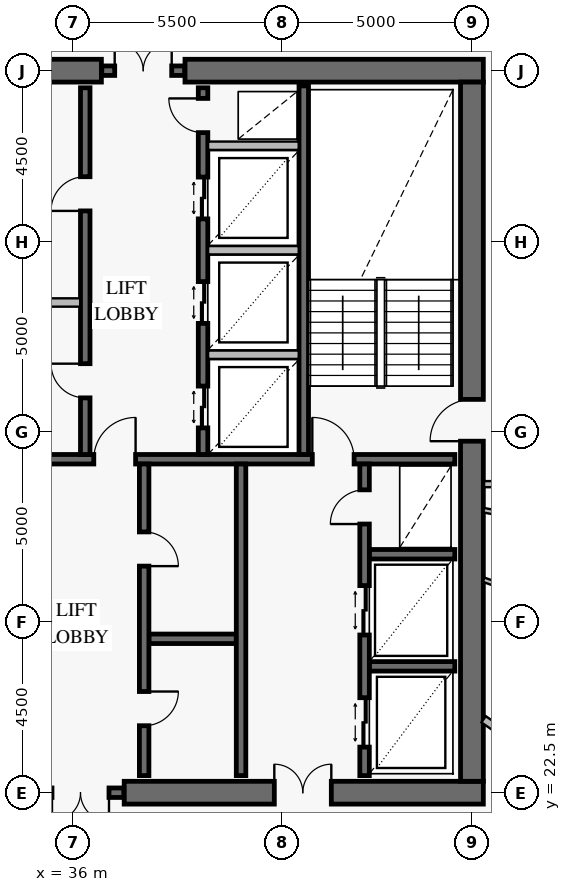
"""IFC4 building model, lengths in metres.
Left out: names, types, materials, properties, quantities, classifications, styles, units other than length and angle.
Written with IfcOpenShell. Run it as: python <this file> out.ifc"""

import sys

from ifc_helpers import new_model, si_unit, direction, frame, frame_2d, origin, place, context, subcontext, project, spatial, rectangle, extrude, element, fill, save


model = new_model("IFC4")
c1 = context("Model", 3, precision=1e-05, world=origin(), true_north=direction((0.0, 1.0)))
c2 = subcontext(c1, "Body", "Model", "MODEL_VIEW")
j1 = project(units=[si_unit("LENGTHUNIT", "METRE"), si_unit("PLANEANGLEUNIT", "RADIAN")], contexts=[c1])
p1 = place(None, origin())
s1 = spatial("IfcSite", under=j1, at=p1, CompositionType="ELEMENT")
p2 = place(p1, origin())
s2 = spatial("IfcBuilding", under=s1, at=p2, CompositionType="ELEMENT")
p3 = place(p2, frame((0.0, 0.0, 276.8)))
s3 = spatial("IfcBuildingStorey", under=s2, at=p3, CompositionType="ELEMENT", Elevation=276.8)
p4 = place(p3, frame((37.35, 22.5, 0.0), z_axis=(0.0, 0.0, 1.0), x_axis=(1.0, 0.0, 0.0)))
e1 = element("IfcWall", 1, at=p4, inside=s3, PredefinedType="SHEAR", context=c2, shape_type="SweptSolid", body=[
    extrude(rectangle(XDim=9.45, YDim=0.6, at=frame_2d((4.725, 0.0))), origin(), (0.0, 0.0, 1.0), 3.8),
])
p5 = place(p4, frame((3.95, 0.0, 0.0)))
e2 = element("IfcOpeningElement", 2, at=p5, cuts=e1, PredefinedType="OPENING", context=c2, shape_type="SweptSolid", body=[
    extrude(rectangle(XDim=1.5, YDim=2.15, at=frame_2d((0.75, 1.075))), frame((0.0, 0.312, 0.0), z_axis=(0.0, -1.0, 0.0), x_axis=(1.0, 0.0, 0.0)), (0.0, 0.0, 1.0), 0.624),
])
p6 = place(p3, frame((46.8, 41.5, 0.0), z_axis=(0.0, 0.0, 1.0), x_axis=(-1.0, 0.0, 0.0)))
e3 = element("IfcWall", 3, at=p6, inside=s3, PredefinedType="SHEAR", context=c2, shape_type="SweptSolid", body=[
    extrude(rectangle(XDim=7.85, YDim=0.6, at=frame_2d((3.925, 0.0))), origin(), (0.0, 0.0, 1.0), 3.8),
])
p7 = place(p3, frame((36.75, 41.5, 0.0), z_axis=(0.0, 0.0, 1.0), x_axis=(-1.0, 0.0, 0.0)))
e4 = element("IfcWall", 4, at=p7, inside=s3, PredefinedType="SHEAR", context=c2, shape_type="SweptSolid", body=[
    extrude(rectangle(XDim=11.55, YDim=0.6, at=frame_2d((5.775, 0.0))), origin(), (0.0, 0.0, 1.0), 3.8),
])
p8 = place(p7, frame((4.25, 0.0, 0.0)))
e5 = element("IfcOpeningElement", 5, at=p8, cuts=e4, PredefinedType="OPENING", context=c2, shape_type="SweptSolid", body=[
    extrude(rectangle(XDim=1.1, YDim=2.15, at=frame_2d((0.55, 1.075))), frame((0.0, 0.312, 0.0), z_axis=(0.0, -1.0, 0.0), x_axis=(1.0, 0.0, 0.0)), (0.0, 0.0, 1.0), 0.624),
])
p9 = place(p3, frame((46.5, 22.8, 0.0), z_axis=(0.0, 0.0, 1.0), x_axis=(0.0, 1.0, 0.0)))
e6 = element("IfcWall", 6, at=p9, inside=s3, PredefinedType="SHEAR", context=c2, shape_type="SweptSolid", body=[
    extrude(rectangle(XDim=18.4, YDim=0.6, at=frame_2d((9.2, 0.0))), origin(), (0.0, 0.0, 1.0), 3.8),
])
p10 = place(p9, frame((8.95, 0.0, 0.0)))
e7 = element("IfcOpeningElement", 7, at=p10, cuts=e6, PredefinedType="OPENING", context=c2, shape_type="SweptSolid", body=[
    extrude(rectangle(XDim=1.1, YDim=2.15, at=frame_2d((0.55, 1.075))), frame((0.0, 0.312, 0.0), z_axis=(0.0, -1.0, 0.0), x_axis=(1.0, 0.0, 0.0)), (0.0, 0.0, 1.0), 0.624),
])
p11 = place(p3, frame((35.06, 22.5, 0.0), z_axis=(0.0, 0.0, 1.0), x_axis=(1.0, 0.0, 0.0)))
e8 = element("IfcWall", 8, at=p11, inside=s3, PredefinedType="SOLIDWALL", context=c2, shape_type="SweptSolid", body=[
    extrude(rectangle(XDim=2.28, YDim=0.25, at=frame_2d((1.14, 0.0))), origin(), (0.0, 0.0, 1.0), 3.8),
])
p12 = place(p11, frame((0.39, 0.0, 0.0)))
e9 = element("IfcOpeningElement", 9, at=p12, cuts=e8, PredefinedType="OPENING", context=c2, shape_type="SweptSolid", body=[
    extrude(rectangle(XDim=1.5, YDim=2.15, at=frame_2d((0.75, 1.075))), frame((0.0, 0.137, 0.0), z_axis=(0.0, -1.0, 0.0), x_axis=(1.0, 0.0, 0.0)), (0.0, 0.0, 1.0), 0.274),
])
p13 = place(p3, frame((36.76, 41.5, 0.0), z_axis=(0.0, 0.0, 1.0), x_axis=(1.0, 0.0, 0.0)))
e10 = element("IfcWall", 10, at=p13, inside=s3, PredefinedType="SOLIDWALL", context=c2, shape_type="SweptSolid", body=[
    extrude(rectangle(XDim=2.18, YDim=0.25, at=frame_2d((1.09, 0.0))), origin(), (0.0, 0.0, 1.0), 3.8),
])
p14 = place(p13, frame((0.34, 0.0, 0.0)))
e11 = element("IfcOpeningElement", 11, at=p14, cuts=e10, PredefinedType="OPENING", context=c2, shape_type="SweptSolid", body=[
    extrude(rectangle(XDim=1.5, YDim=2.15, at=frame_2d((0.75, 1.075))), frame((0.0, 0.137, 0.0), z_axis=(0.0, -1.0, 0.0), x_axis=(1.0, 0.0, 0.0)), (0.0, 0.0, 1.0), 0.274),
])
p15 = place(p3, frame((25.95, 31.275, 0.0), z_axis=(0.0, 0.0, 1.0), x_axis=(1.0, 0.0, 0.0)))
e12 = element("IfcWall", 12, at=p15, inside=s3, PredefinedType="SOLIDWALL", context=c2, shape_type="SweptSolid", body=[
    extrude(rectangle(XDim=20.1, YDim=0.25, at=frame_2d((10.05, 0.0))), origin(), (0.0, 0.0, 1.0), 3.8),
])
p16 = place(p15, frame((2.6, 0.0, 0.0)))
e13 = element("IfcOpeningElement", 13, at=p16, cuts=e12, PredefinedType="OPENING", context=c2, shape_type="SweptSolid", body=[
    extrude(rectangle(XDim=1.1, YDim=2.15, at=frame_2d((0.55, 1.075))), frame((0.0, 0.137, 0.0), z_axis=(0.0, -1.0, 0.0), x_axis=(1.0, 0.0, 0.0)), (0.0, 0.0, 1.0), 0.274),
])
p17 = place(p15, frame((10.6, 0.0, 0.0)))
e14 = element("IfcOpeningElement", 14, at=p17, cuts=e12, PredefinedType="OPENING", context=c2, shape_type="SweptSolid", body=[
    extrude(rectangle(XDim=1.1, YDim=2.15, at=frame_2d((0.55, 1.075))), frame((0.0, 0.137, 0.0), z_axis=(0.0, -1.0, 0.0), x_axis=(1.0, 0.0, 0.0)), (0.0, 0.0, 1.0), 0.274),
])
p18 = place(p15, frame((16.35, 0.0, 0.0)))
e15 = element("IfcOpeningElement", 15, at=p18, cuts=e12, PredefinedType="OPENING", context=c2, shape_type="SweptSolid", body=[
    extrude(rectangle(XDim=1.1, YDim=2.15, at=frame_2d((0.55, 1.075))), frame((0.0, 0.137, 0.0), z_axis=(0.0, -1.0, 0.0), x_axis=(1.0, 0.0, 0.0)), (0.0, 0.0, 1.0), 0.274),
])
p19 = place(p3, frame((42.075, 31.4, 0.0), z_axis=(0.0, 0.0, 1.0), x_axis=(0.0, 1.0, 0.0)))
e16 = element("IfcWall", 16, at=p19, inside=s3, PredefinedType="SOLIDWALL", context=c2, shape_type="SweptSolid", body=[
    extrude(rectangle(XDim=9.7, YDim=0.25, at=frame_2d((4.85, 0.0))), origin(), (0.0, 0.0, 1.0), 3.8),
])
p20 = place(p3, frame((36.325, 31.4, 0.0), z_axis=(0.0, 0.0, 1.0), x_axis=(0.0, 1.0, 0.0)))
e17 = element("IfcWall", 17, at=p20, inside=s3, PredefinedType="SOLIDWALL", context=c2, shape_type="SweptSolid", body=[
    extrude(rectangle(XDim=9.65, YDim=0.25, at=frame_2d((4.825, 0.0))), origin(), (0.0, 0.0, 1.0), 3.8),
])
p21 = place(p20, frame((1.49, 0.0, 0.0)))
e18 = element("IfcOpeningElement", 18, at=p21, cuts=e17, PredefinedType="OPENING", context=c2, shape_type="SweptSolid", body=[
    extrude(rectangle(XDim=0.9, YDim=2.1, at=frame_2d((0.45, 1.05))), frame((0.0, 0.137, 0.0), z_axis=(0.0, -1.0, 0.0), x_axis=(1.0, 0.0, 0.0)), (0.0, 0.0, 1.0), 0.274),
])
p22 = place(p20, frame((6.41, 0.0, 0.0)))
e19 = element("IfcOpeningElement", 19, at=p22, cuts=e17, PredefinedType="OPENING", context=c2, shape_type="SweptSolid", body=[
    extrude(rectangle(XDim=0.9, YDim=2.1, at=frame_2d((0.45, 1.05))), frame((0.0, 0.137, 0.0), z_axis=(0.0, -1.0, 0.0), x_axis=(1.0, 0.0, 0.0)), (0.0, 0.0, 1.0), 0.274),
])
p23 = place(p3, frame((39.425, 31.4, 0.0), z_axis=(0.0, 0.0, 1.0), x_axis=(0.0, 1.0, 0.0)))
e20 = element("IfcWall", 20, at=p23, inside=s3, PredefinedType="SOLIDWALL", context=c2, shape_type="SweptSolid", body=[
    extrude(rectangle(XDim=9.65, YDim=0.25, at=frame_2d((4.825, 0.0))), origin(), (0.0, 0.0, 1.0), 3.8),
])
p24 = place(p23, frame((0.7, 0.0, 0.0)))
e21 = element("IfcOpeningElement", 21, at=p24, cuts=e20, PredefinedType="OPENING", context=c2, shape_type="SweptSolid", body=[
    extrude(rectangle(XDim=1.1, YDim=2.2, at=frame_2d((0.55, 1.1))), frame((0.0, 0.137, 0.0), z_axis=(0.0, -1.0, 0.0), x_axis=(1.0, 0.0, 0.0)), (0.0, 0.0, 1.0), 0.274),
])
p25 = place(p23, frame((3.45, 0.0, 0.0)))
e22 = element("IfcOpeningElement", 22, at=p25, cuts=e20, PredefinedType="OPENING", context=c2, shape_type="SweptSolid", body=[
    extrude(rectangle(XDim=1.1, YDim=2.2, at=frame_2d((0.55, 1.1))), frame((0.0, 0.137, 0.0), z_axis=(0.0, -1.0, 0.0), x_axis=(1.0, 0.0, 0.0)), (0.0, 0.0, 1.0), 0.274),
])
p26 = place(p23, frame((6.2, 0.0, 0.0)))
e23 = element("IfcOpeningElement", 23, at=p26, cuts=e20, PredefinedType="OPENING", context=c2, shape_type="SweptSolid", body=[
    extrude(rectangle(XDim=1.1, YDim=2.2, at=frame_2d((0.55, 1.1))), frame((0.0, 0.137, 0.0), z_axis=(0.0, -1.0, 0.0), x_axis=(1.0, 0.0, 0.0)), (0.0, 0.0, 1.0), 0.274),
])
p27 = place(p23, frame((8.47, 0.0, 0.0)))
e24 = element("IfcOpeningElement", 24, at=p27, cuts=e20, PredefinedType="OPENING", context=c2, shape_type="SweptSolid", body=[
    extrude(rectangle(XDim=0.9, YDim=2.1, at=frame_2d((0.45, 1.05))), frame((0.0, 0.137, 0.0), z_axis=(0.0, -1.0, 0.0), x_axis=(1.0, 0.0, 0.0)), (0.0, 0.0, 1.0), 0.274),
])
p28 = place(p3, frame((38.0, 26.55, 0.0), z_axis=(0.0, 0.0, 1.0), x_axis=(1.0, 0.0, 0.0)))
e25 = element("IfcWall", 25, at=p28, inside=s3, PredefinedType="SOLIDWALL", context=c2, shape_type="SweptSolid", body=[
    extrude(rectangle(XDim=2.3, YDim=0.25, at=frame_2d((1.15, 0.0))), origin(), (0.0, 0.0, 1.0), 3.8),
])
p29 = place(p3, frame((37.875, 22.95, 0.0), z_axis=(0.0, 0.0, 1.0), x_axis=(0.0, 1.0, 0.0)))
e26 = element("IfcWall", 26, at=p29, inside=s3, PredefinedType="SOLIDWALL", context=c2, shape_type="SweptSolid", body=[
    extrude(rectangle(XDim=8.2, YDim=0.25, at=frame_2d((4.1, 0.0))), origin(), (0.0, 0.0, 1.0), 3.8),
])
p30 = place(p29, frame((1.312, 0.0, 0.0)))
e27 = element("IfcOpeningElement", 27, at=p30, cuts=e26, PredefinedType="OPENING", context=c2, shape_type="SweptSolid", body=[
    extrude(rectangle(XDim=0.9, YDim=2.1, at=frame_2d((0.45, 1.05))), frame((0.0, 0.137, 0.0), z_axis=(0.0, -1.0, 0.0), x_axis=(1.0, 0.0, 0.0)), (0.0, 0.0, 1.0), 0.274),
])
p31 = place(p29, frame((5.512, 0.0, 0.0)))
e28 = element("IfcOpeningElement", 28, at=p31, cuts=e26, PredefinedType="OPENING", context=c2, shape_type="SweptSolid", body=[
    extrude(rectangle(XDim=0.9, YDim=2.1, at=frame_2d((0.45, 1.05))), frame((0.0, 0.137, 0.0), z_axis=(0.0, -1.0, 0.0), x_axis=(1.0, 0.0, 0.0)), (0.0, 0.0, 1.0), 0.274),
])
p32 = place(p3, frame((40.425, 22.95, 0.0), z_axis=(0.0, 0.0, 1.0), x_axis=(0.0, 1.0, 0.0)))
e29 = element("IfcWall", 29, at=p32, inside=s3, PredefinedType="SOLIDWALL", context=c2, shape_type="SweptSolid", body=[
    extrude(rectangle(XDim=8.2, YDim=0.25, at=frame_2d((4.1, 0.0))), origin(), (0.0, 0.0, 1.0), 3.8),
])
for number, where, z_axis, x_axis in (
    (30, (43.8, 25.825, 0.0), (0.0, 0.0, 1.0), (1.0, 0.0, 0.0)),
    (31, (43.8, 28.775, 0.0), (0.0, 0.0, 1.0), (1.0, 0.0, 0.0)),
):
    element("IfcWall", number, at=place(p3, frame(where, z_axis=z_axis, x_axis=x_axis)), inside=s3, PredefinedType="SOLIDWALL", context=c2, shape_type="SweptSolid", body=[
        extrude(rectangle(XDim=2.25, YDim=0.25, at=frame_2d((1.125, 0.0))), origin(), (0.0, 0.0, 1.0), 3.8),
    ])
p33 = place(p3, frame((43.675, 22.95, 0.0), z_axis=(0.0, 0.0, 1.0), x_axis=(0.0, 1.0, 0.0)))
e32 = element("IfcWall", 32, at=p33, inside=s3, PredefinedType="SOLIDWALL", context=c2, shape_type="SweptSolid", body=[
    extrude(rectangle(XDim=8.2, YDim=0.25, at=frame_2d((4.1, 0.0))), origin(), (0.0, 0.0, 1.0), 3.8),
])
p34 = place(p33, frame((0.75, 0.0, 0.0)))
e33 = element("IfcOpeningElement", 33, at=p34, cuts=e32, PredefinedType="OPENING", context=c2, shape_type="SweptSolid", body=[
    extrude(rectangle(XDim=1.3, YDim=2.3, at=frame_2d((0.65, 1.15))), frame((0.0, 0.137, 0.0), z_axis=(0.0, -1.0, 0.0), x_axis=(1.0, 0.0, 0.0)), (0.0, 0.0, 1.0), 0.274),
])
p35 = place(p33, frame((3.7, 0.0, 0.0)))
e34 = element("IfcOpeningElement", 34, at=p35, cuts=e32, PredefinedType="OPENING", context=c2, shape_type="SweptSolid", body=[
    extrude(rectangle(XDim=1.3, YDim=2.3, at=frame_2d((0.65, 1.15))), frame((0.0, 0.137, 0.0), z_axis=(0.0, -1.0, 0.0), x_axis=(1.0, 0.0, 0.0)), (0.0, 0.0, 1.0), 0.274),
])
p36 = place(p33, frame((6.62, 0.0, 0.0)))
e35 = element("IfcOpeningElement", 35, at=p36, cuts=e32, PredefinedType="OPENING", context=c2, shape_type="SweptSolid", body=[
    extrude(rectangle(XDim=0.9, YDim=2.1, at=frame_2d((0.45, 1.05))), frame((0.0, 0.137, 0.0), z_axis=(0.0, -1.0, 0.0), x_axis=(1.0, 0.0, 0.0)), (0.0, 0.0, 1.0), 0.274),
])
p37 = place(p3, frame((46.82, 30.62, 0.0), z_axis=(0.0, 0.0, 1.0), x_axis=(1.0, 0.0, 0.0)))
e36 = element("IfcWall", 36, at=p37, inside=s3, PredefinedType="PARTITIONING", context=c2, shape_type="SweptSolid", body=[
    extrude(rectangle(XDim=2.029, YDim=0.16, at=frame_2d((1.015, 0.0))), origin(), (0.0, 0.0, 1.0), 3.55),
])
p38 = place(p37, frame((0.49, 0.0, 0.0)))
e37 = element("IfcOpeningElement", 37, at=p38, cuts=e36, PredefinedType="OPENING", context=c2, shape_type="SweptSolid", body=[
    extrude(rectangle(XDim=1.05, YDim=2.15, at=frame_2d((0.525, 1.075))), frame((0.0, 0.092, 0.0), z_axis=(0.0, -1.0, 0.0), x_axis=(1.0, 0.0, 0.0)), (0.0, 0.0, 1.0), 0.184),
])
p39 = place(p3, frame((34.108, 35.4, 0.0), z_axis=(0.0, 0.0, 1.0), x_axis=(1.0, 0.0, 0.0)))
e38 = element("IfcWall", 38, at=p39, inside=s3, PredefinedType="PARTITIONING", context=c2, shape_type="SweptSolid", body=[
    extrude(rectangle(XDim=2.084, YDim=0.22, at=frame_2d((1.042, 0.0))), origin(), (0.0, 0.0, 1.0), 3.55),
])
for number, where, z_axis, x_axis in (
    (39, (39.558, 34.025, 0.0), (0.0, 0.0, 1.0), (1.0, 0.0, 0.0)),
    (40, (39.558, 36.775, 0.0), (0.0, 0.0, 1.0), (1.0, 0.0, 0.0)),
    (41, (39.558, 39.525, 0.0), (0.0, 0.0, 1.0), (1.0, 0.0, 0.0)),
):
    element("IfcWall", number, at=place(p3, frame(where, z_axis=z_axis, x_axis=x_axis)), inside=s3, PredefinedType="PARTITIONING", context=c2, shape_type="SweptSolid", body=[
        extrude(rectangle(XDim=2.384, YDim=0.22, at=frame_2d((1.192, 0.0))), origin(), (0.0, 0.0, 1.0), 3.55),
    ])
p40 = place(p3, frame((46.808, 24.432, 0.0), z_axis=(0.0, 0.0, 1.0), x_axis=(0.819149112162, -0.57358062384, 0.0)))
e42 = element("IfcWall", 42, at=p40, inside=s3, PredefinedType="PARTITIONING", context=c2, shape_type="SweptSolid", body=[
    extrude(rectangle(XDim=12.467, YDim=0.2, at=frame_2d((6.233, 0.0))), origin(), (0.0, 0.0, 1.0), 2.93),
])
p41 = place(p3, frame((46.808, 28.105, 0.0), z_axis=(0.0, 0.0, 1.0), x_axis=(0.940760677373, -0.339071302101, 0.0)))
e43 = element("IfcWall", 43, at=p41, inside=s3, PredefinedType="PARTITIONING", context=c2, shape_type="SweptSolid", body=[
    extrude(rectangle(XDim=2.973, YDim=0.12, at=frame_2d((1.486, 0.0))), origin(), (0.0, 0.0, 1.0), 3.55),
])
p42 = place(p3, frame((46.808, 29.934, 0.0), z_axis=(0.0, 0.0, 1.0), x_axis=(0.982225672126, -0.187703833251, 0.0)))
e44 = element("IfcWall", 44, at=p42, inside=s3, PredefinedType="PARTITIONING", context=c2, shape_type="SweptSolid", body=[
    extrude(rectangle(XDim=3.754, YDim=0.12, at=frame_2d((1.877, 0.0))), origin(), (0.0, 0.0, 1.0), 3.55),
])
p43 = place(p10, origin())
e45 = element("IfcDoor", 45, at=p43, inside=s3, OperationType="SINGLE_SWING_LEFT", PredefinedType="USERDEFINED", context=c2, shape_type="SweptSolid", body=[
    extrude(rectangle(XDim=1.1, YDim=2.15, at=frame_2d((0.55, 1.075))), frame((0.0, 0.025, 0.0), z_axis=(0.0, -1.0, 0.0), x_axis=(1.0, 0.0, 0.0)), (0.0, 0.0, 1.0), 0.05),
])
fill(e7, e45)
p44 = place(p5, origin())
e46 = element("IfcDoor", 46, at=p44, inside=s3, OperationType="DOUBLE_DOOR_SINGLE_SWING", PredefinedType="DOOR", context=c2, shape_type="SweptSolid", body=[
    extrude(rectangle(XDim=1.5, YDim=2.15, at=frame_2d((0.75, 1.075))), frame((0.0, 0.025, 0.0), z_axis=(0.0, -1.0, 0.0), x_axis=(1.0, 0.0, 0.0)), (0.0, 0.0, 1.0), 0.05),
])
fill(e2, e46)
p45 = place(p12, frame((1.5, 0.0, 0.0), z_axis=(0.0, 0.0, 1.0), x_axis=(-1.0, 0.0, 0.0)))
e47 = element("IfcDoor", 47, at=p45, inside=s3, OperationType="DOUBLE_DOOR_SINGLE_SWING", PredefinedType="DOOR", context=c2, shape_type="SweptSolid", body=[
    extrude(rectangle(XDim=1.5, YDim=2.15, at=frame_2d((0.75, 1.075))), frame((0.0, 0.025, 0.0), z_axis=(0.0, -1.0, 0.0), x_axis=(1.0, 0.0, 0.0)), (0.0, 0.0, 1.0), 0.05),
])
fill(e9, e47)
p46 = place(p14, origin())
e48 = element("IfcDoor", 48, at=p46, inside=s3, OperationType="DOUBLE_DOOR_SINGLE_SWING", PredefinedType="DOOR", context=c2, shape_type="SweptSolid", body=[
    extrude(rectangle(XDim=1.5, YDim=2.15, at=frame_2d((0.75, 1.075))), frame((0.0, 0.025, 0.0), z_axis=(0.0, -1.0, 0.0), x_axis=(1.0, 0.0, 0.0)), (0.0, 0.0, 1.0), 0.05),
])
fill(e11, e48)
p47 = place(p17, origin())
e49 = element("IfcDoor", 49, at=p47, inside=s3, OperationType="SINGLE_SWING_RIGHT", PredefinedType="USERDEFINED", context=c2, shape_type="SweptSolid", body=[
    extrude(rectangle(XDim=1.1, YDim=2.15, at=frame_2d((0.55, 1.075))), frame((0.0, 0.025, 0.0), z_axis=(0.0, -1.0, 0.0), x_axis=(1.0, 0.0, 0.0)), (0.0, 0.0, 1.0), 0.05),
])
fill(e14, e49)
p48 = place(p18, origin())
e50 = element("IfcDoor", 50, at=p48, inside=s3, OperationType="SINGLE_SWING_LEFT", PredefinedType="USERDEFINED", context=c2, shape_type="SweptSolid", body=[
    extrude(rectangle(XDim=1.1, YDim=2.15, at=frame_2d((0.55, 1.075))), frame((0.0, 0.025, 0.0), z_axis=(0.0, -1.0, 0.0), x_axis=(1.0, 0.0, 0.0)), (0.0, 0.0, 1.0), 0.05),
])
fill(e15, e50)
p49 = place(p21, origin())
e51 = element("IfcDoor", 51, at=p49, inside=s3, OperationType="SINGLE_SWING_RIGHT", PredefinedType="DOOR", context=c2, shape_type="SweptSolid", body=[
    extrude(rectangle(XDim=0.9, YDim=2.1, at=frame_2d((0.45, 1.05))), frame((0.0, 0.025, 0.0), z_axis=(0.0, -1.0, 0.0), x_axis=(1.0, 0.0, 0.0)), (0.0, 0.0, 1.0), 0.05),
])
fill(e18, e51)
p50 = place(p22, origin())
e52 = element("IfcDoor", 52, at=p50, inside=s3, OperationType="SINGLE_SWING_LEFT", PredefinedType="DOOR", context=c2, shape_type="SweptSolid", body=[
    extrude(rectangle(XDim=0.9, YDim=2.1, at=frame_2d((0.45, 1.05))), frame((0.0, 0.025, 0.0), z_axis=(0.0, -1.0, 0.0), x_axis=(1.0, 0.0, 0.0)), (0.0, 0.0, 1.0), 0.05),
])
fill(e19, e52)
p51 = place(p24, origin())
e53 = element("IfcDoor", 53, at=p51, inside=s3, OperationType="DOUBLE_DOOR_SLIDING", PredefinedType="DOOR", context=c2, shape_type="SweptSolid", body=[
    extrude(rectangle(XDim=1.1, YDim=2.2, at=frame_2d((0.55, 1.1))), frame((0.0, 0.025, 0.0), z_axis=(0.0, -1.0, 0.0), x_axis=(1.0, 0.0, 0.0)), (0.0, 0.0, 1.0), 0.05),
])
fill(e21, e53)
p52 = place(p25, origin())
e54 = element("IfcDoor", 54, at=p52, inside=s3, OperationType="DOUBLE_DOOR_SLIDING", PredefinedType="DOOR", context=c2, shape_type="SweptSolid", body=[
    extrude(rectangle(XDim=1.1, YDim=2.2, at=frame_2d((0.55, 1.1))), frame((0.0, 0.025, 0.0), z_axis=(0.0, -1.0, 0.0), x_axis=(1.0, 0.0, 0.0)), (0.0, 0.0, 1.0), 0.05),
])
fill(e22, e54)
p53 = place(p26, origin())
e55 = element("IfcDoor", 55, at=p53, inside=s3, OperationType="DOUBLE_DOOR_SLIDING", PredefinedType="DOOR", context=c2, shape_type="SweptSolid", body=[
    extrude(rectangle(XDim=1.1, YDim=2.2, at=frame_2d((0.55, 1.1))), frame((0.0, 0.025, 0.0), z_axis=(0.0, -1.0, 0.0), x_axis=(1.0, 0.0, 0.0)), (0.0, 0.0, 1.0), 0.05),
])
fill(e23, e55)
p54 = place(p27, origin())
e56 = element("IfcDoor", 56, at=p54, inside=s3, OperationType="SINGLE_SWING_RIGHT", PredefinedType="DOOR", context=c2, shape_type="SweptSolid", body=[
    extrude(rectangle(XDim=0.9, YDim=2.1, at=frame_2d((0.45, 1.05))), frame((0.0, 0.025, 0.0), z_axis=(0.0, -1.0, 0.0), x_axis=(1.0, 0.0, 0.0)), (0.0, 0.0, 1.0), 0.05),
])
fill(e24, e56)
p55 = place(p30, frame((0.9, 0.0, 0.0), z_axis=(0.0, 0.0, 1.0), x_axis=(-1.0, 0.0, 0.0)))
e57 = element("IfcDoor", 57, at=p55, inside=s3, OperationType="SINGLE_SWING_LEFT", PredefinedType="DOOR", context=c2, shape_type="SweptSolid", body=[
    extrude(rectangle(XDim=0.9, YDim=2.1, at=frame_2d((0.45, 1.05))), frame((0.0, 0.025, 0.0), z_axis=(0.0, -1.0, 0.0), x_axis=(1.0, 0.0, 0.0)), (0.0, 0.0, 1.0), 0.05),
])
fill(e27, e57)
p56 = place(p31, frame((0.9, 0.0, 0.0), z_axis=(0.0, 0.0, 1.0), x_axis=(-1.0, 0.0, 0.0)))
e58 = element("IfcDoor", 58, at=p56, inside=s3, OperationType="SINGLE_SWING_RIGHT", PredefinedType="DOOR", context=c2, shape_type="SweptSolid", body=[
    extrude(rectangle(XDim=0.9, YDim=2.1, at=frame_2d((0.45, 1.05))), frame((0.0, 0.025, 0.0), z_axis=(0.0, -1.0, 0.0), x_axis=(1.0, 0.0, 0.0)), (0.0, 0.0, 1.0), 0.05),
])
fill(e28, e58)
p57 = place(p34, origin())
e59 = element("IfcDoor", 59, at=p57, inside=s3, OperationType="DOUBLE_DOOR_SLIDING", PredefinedType="DOOR", context=c2, shape_type="SweptSolid", body=[
    extrude(rectangle(XDim=1.3, YDim=2.3, at=frame_2d((0.65, 1.15))), frame((0.0, 0.025, 0.0), z_axis=(0.0, -1.0, 0.0), x_axis=(1.0, 0.0, 0.0)), (0.0, 0.0, 1.0), 0.05),
])
fill(e33, e59)
p58 = place(p35, origin())
e60 = element("IfcDoor", 60, at=p58, inside=s3, OperationType="DOUBLE_DOOR_SLIDING", PredefinedType="DOOR", context=c2, shape_type="SweptSolid", body=[
    extrude(rectangle(XDim=1.3, YDim=2.3, at=frame_2d((0.65, 1.15))), frame((0.0, 0.025, 0.0), z_axis=(0.0, -1.0, 0.0), x_axis=(1.0, 0.0, 0.0)), (0.0, 0.0, 1.0), 0.05),
])
fill(e34, e60)
p59 = place(p36, origin())
e61 = element("IfcDoor", 61, at=p59, inside=s3, OperationType="SINGLE_SWING_LEFT", PredefinedType="DOOR", context=c2, shape_type="SweptSolid", body=[
    extrude(rectangle(XDim=0.9, YDim=2.1, at=frame_2d((0.45, 1.05))), frame((0.0, 0.025, 0.0), z_axis=(0.0, -1.0, 0.0), x_axis=(1.0, 0.0, 0.0)), (0.0, 0.0, 1.0), 0.05),
])
fill(e35, e61)
save(model, sys.argv[1])
